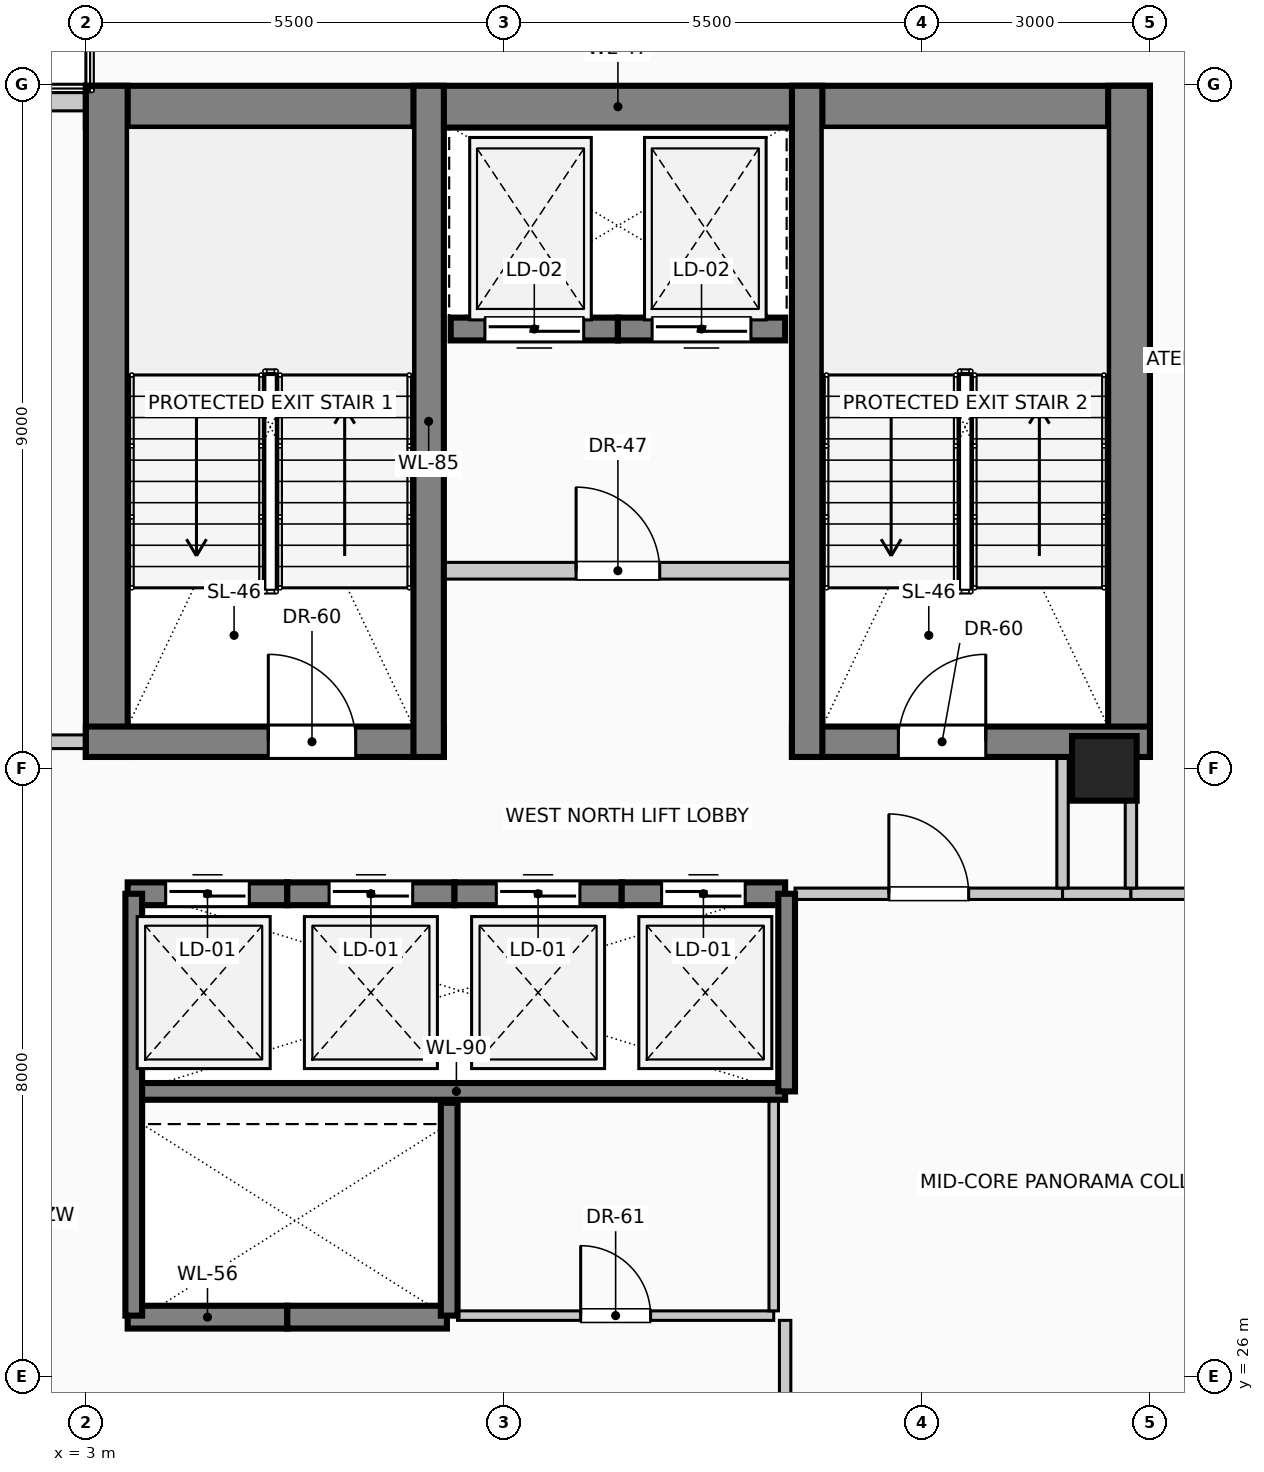
"""IFC4 building model, lengths in metres.
Left out: names, types, materials, properties, quantities, classifications, styles, units other than length and angle.
Written with IfcOpenShell. Run it as: python <this file> out.ifc"""

import sys

from ifc_helpers import new_model, si_unit, direction, frame, frame_2d, origin, origin_2d, place, context, subcontext, project, spatial, rectangle, circle, extrude, element, fill, save


model = new_model("IFC4")
c1 = context("Model", 3, precision=1e-05, world=origin(), true_north=direction((0.0, 1.0)))
c2 = subcontext(c1, "Body", "Model", "MODEL_VIEW")
j1 = project(units=[si_unit("LENGTHUNIT", "METRE"), si_unit("PLANEANGLEUNIT", "RADIAN")], contexts=[c1])
p1 = place(None, origin())
s1 = spatial("IfcSite", under=j1, at=p1, CompositionType="ELEMENT")
p2 = place(p1, origin())
s2 = spatial("IfcBuilding", under=s1, at=p2, CompositionType="ELEMENT")
p3 = place(p2, frame((0.0, 0.0, 272.6)))
s3 = spatial("IfcBuildingStorey", under=s2, at=p3, CompositionType="ELEMENT", Elevation=272.6)
p4 = place(p3, frame((3.0, 42.705, 0.0), z_axis=(0.0, 0.0, 1.0), x_axis=(1.0, 0.0, 0.0)))
e1 = element("IfcWall", 1, at=p4, inside=s3, PredefinedType="SHEAR", context=c2, shape_type="SweptSolid", body=[
    extrude(rectangle(XDim=14.0, YDim=0.55, at=frame_2d((7.0, 0.0))), origin(), (0.0, 0.0, 1.0), 4.0),
])
for number, where, z_axis, x_axis in (
    (2, (3.275, 34.15, 0.0), (0.0, 0.0, 1.0), (0.0, 1.0, 0.0)),
    (3, (16.725, 34.15, 0.0), (0.0, 0.0, 1.0), (0.0, 1.0, 0.0)),
):
    element("IfcWall", number, at=place(p3, frame(where, z_axis=z_axis, x_axis=x_axis)), inside=s3, PredefinedType="SHEAR", context=c2, shape_type="SweptSolid", body=[
        extrude(rectangle(XDim=8.83, YDim=0.55, at=frame_2d((4.415, 0.0))), origin(), (0.0, 0.0, 1.0), 4.0),
    ])
p5 = place(p3, frame((3.0, 34.35, 0.0), z_axis=(0.0, 0.0, 1.0), x_axis=(1.0, 0.0, 0.0)))
e4 = element("IfcWall", 4, at=p5, inside=s3, PredefinedType="SHEAR", context=c2, shape_type="SweptSolid", body=[
    extrude(rectangle(XDim=4.71, YDim=0.4, at=frame_2d((2.355, 0.0))), origin(), (0.0, 0.0, 1.0), 4.0),
])
p6 = place(p5, frame((2.4, 0.0, 0.0)))
e5 = element("IfcOpeningElement", 5, at=p6, cuts=e4, PredefinedType="OPENING", context=c2, shape_type="SweptSolid", body=[
    extrude(rectangle(XDim=1.15, YDim=2.2, at=frame_2d((0.575, 1.1))), frame((0.0, 0.21, 0.0), z_axis=(0.0, -1.0, 0.0), x_axis=(1.0, 0.0, 0.0)), (0.0, 0.0, 1.0), 0.42),
])
p7 = place(p3, frame((12.29, 34.35, 0.0), z_axis=(0.0, 0.0, 1.0), x_axis=(1.0, 0.0, 0.0)))
e6 = element("IfcWall", 6, at=p7, inside=s3, PredefinedType="SHEAR", context=c2, shape_type="SweptSolid", body=[
    extrude(rectangle(XDim=4.71, YDim=0.4, at=frame_2d((2.355, 0.0))), origin(), (0.0, 0.0, 1.0), 4.0),
])
p8 = place(p7, frame((1.4, 0.0, 0.0)))
e7 = element("IfcOpeningElement", 7, at=p8, cuts=e6, PredefinedType="OPENING", context=c2, shape_type="SweptSolid", body=[
    extrude(rectangle(XDim=1.15, YDim=2.2, at=frame_2d((0.575, 1.1))), frame((0.0, 0.21, 0.0), z_axis=(0.0, -1.0, 0.0), x_axis=(1.0, 0.0, 0.0)), (0.0, 0.0, 1.0), 0.42),
])
for number, where, z_axis, x_axis in (
    (8, (7.51, 34.15, 0.0), (0.0, 0.0, 1.0), (0.0, 1.0, 0.0)),
    (9, (12.49, 34.15, 0.0), (0.0, 0.0, 1.0), (0.0, 1.0, 0.0)),
):
    element("IfcWall", number, at=place(p3, frame(where, z_axis=z_axis, x_axis=x_axis)), inside=s3, PredefinedType="SHEAR", context=c2, shape_type="SweptSolid", body=[
        extrude(rectangle(XDim=8.83, YDim=0.4, at=frame_2d((4.415, 0.0))), origin(), (0.0, 0.0, 1.0), 4.0),
    ])
p9 = place(p3, frame((16.4, 34.0, 0.0), z_axis=(0.0, 0.0, 1.0), x_axis=(1.0, 0.0, 0.0)))
e10 = element("IfcColumn", 10, at=p9, inside=s3, PredefinedType="COLUMN", context=c2, shape_type="SweptSolid", body=[
    extrude(circle(Radius=0.425, at=origin_2d()), origin(), (0.0, 0.0, 1.0), 4.0),
])
p10 = place(p3, frame((0.6, 42.77, 0.0), z_axis=(0.0, 0.0, 1.0), x_axis=(1.0, 0.0, 0.0)))
e11 = element("IfcWall", 11, at=p10, inside=s3, PredefinedType="SOLIDWALL", context=c2, shape_type="SweptSolid", body=[
    extrude(rectangle(XDim=2.395, YDim=0.24, at=frame_2d((1.198, 0.0))), origin(), (0.0, 0.0, 1.0), 3.75),
])
p11 = place(p3, frame((3.55, 32.35, 0.0), z_axis=(0.0, 0.0, 1.0), x_axis=(1.0, 0.0, 0.0)))
e12 = element("IfcWall", 12, at=p11, inside=s3, PredefinedType="SOLIDWALL", context=c2, shape_type="SweptSolid", body=[
    extrude(rectangle(XDim=2.1, YDim=0.3, at=frame_2d((1.05, 0.0))), origin(), (0.0, 0.0, 1.0), 4.0),
])
p12 = place(p11, frame((0.5, 0.0, 0.0)))
e13 = element("IfcOpeningElement", 13, at=p12, cuts=e12, PredefinedType="OPENING", context=c2, shape_type="SweptSolid", body=[
    extrude(rectangle(XDim=1.1, YDim=2.2, at=frame_2d((0.55, 1.1))), frame((0.0, 0.16, 0.0), z_axis=(0.0, -1.0, 0.0), x_axis=(1.0, 0.0, 0.0)), (0.0, 0.0, 1.0), 0.32),
])
p13 = place(p3, frame((5.65, 32.35, 0.0), z_axis=(0.0, 0.0, 1.0), x_axis=(1.0, 0.0, 0.0)))
e14 = element("IfcWall", 14, at=p13, inside=s3, PredefinedType="SOLIDWALL", context=c2, shape_type="SweptSolid", body=[
    extrude(rectangle(XDim=2.2, YDim=0.3, at=frame_2d((1.1, 0.0))), origin(), (0.0, 0.0, 1.0), 4.0),
])
p14 = place(p13, frame((0.55, 0.0, 0.0)))
e15 = element("IfcOpeningElement", 15, at=p14, cuts=e14, PredefinedType="OPENING", context=c2, shape_type="SweptSolid", body=[
    extrude(rectangle(XDim=1.1, YDim=2.2, at=frame_2d((0.55, 1.1))), frame((0.0, 0.16, 0.0), z_axis=(0.0, -1.0, 0.0), x_axis=(1.0, 0.0, 0.0)), (0.0, 0.0, 1.0), 0.32),
])
p15 = place(p3, frame((7.85, 32.35, 0.0), z_axis=(0.0, 0.0, 1.0), x_axis=(1.0, 0.0, 0.0)))
e16 = element("IfcWall", 16, at=p15, inside=s3, PredefinedType="SOLIDWALL", context=c2, shape_type="SweptSolid", body=[
    extrude(rectangle(XDim=2.2, YDim=0.3, at=frame_2d((1.1, 0.0))), origin(), (0.0, 0.0, 1.0), 4.0),
])
p16 = place(p15, frame((0.55, 0.0, 0.0)))
e17 = element("IfcOpeningElement", 17, at=p16, cuts=e16, PredefinedType="OPENING", context=c2, shape_type="SweptSolid", body=[
    extrude(rectangle(XDim=1.1, YDim=2.2, at=frame_2d((0.55, 1.1))), frame((0.0, 0.16, 0.0), z_axis=(0.0, -1.0, 0.0), x_axis=(1.0, 0.0, 0.0)), (0.0, 0.0, 1.0), 0.32),
])
p17 = place(p3, frame((10.05, 32.35, 0.0), z_axis=(0.0, 0.0, 1.0), x_axis=(1.0, 0.0, 0.0)))
e18 = element("IfcWall", 18, at=p17, inside=s3, PredefinedType="SOLIDWALL", context=c2, shape_type="SweptSolid", body=[
    extrude(rectangle(XDim=2.15, YDim=0.3, at=frame_2d((1.075, 0.0))), origin(), (0.0, 0.0, 1.0), 4.0),
])
p18 = place(p17, frame((0.525, 0.0, 0.0)))
e19 = element("IfcOpeningElement", 19, at=p18, cuts=e18, PredefinedType="OPENING", context=c2, shape_type="SweptSolid", body=[
    extrude(rectangle(XDim=1.1, YDim=2.2, at=frame_2d((0.55, 1.1))), frame((0.0, 0.16, 0.0), z_axis=(0.0, -1.0, 0.0), x_axis=(1.0, 0.0, 0.0)), (0.0, 0.0, 1.0), 0.32),
])
p19 = place(p3, frame((5.65, 26.78, 0.0), z_axis=(0.0, 0.0, 1.0), x_axis=(-1.0, 0.0, 0.0)))
e20 = element("IfcWall", 20, at=p19, inside=s3, PredefinedType="SOLIDWALL", context=c2, shape_type="SweptSolid", body=[
    extrude(rectangle(XDim=2.1, YDim=0.3, at=frame_2d((1.05, 0.0))), origin(), (0.0, 0.0, 1.0), 4.0),
])
p20 = place(p3, frame((7.75, 26.78, 0.0), z_axis=(0.0, 0.0, 1.0), x_axis=(-1.0, 0.0, 0.0)))
e21 = element("IfcWall", 21, at=p20, inside=s3, PredefinedType="SOLIDWALL", context=c2, shape_type="SweptSolid", body=[
    extrude(rectangle(XDim=2.1, YDim=0.3, at=frame_2d((1.05, 0.0))), origin(), (0.0, 0.0, 1.0), 4.0),
])
p21 = place(p3, frame((10.0, 39.78, 0.0), z_axis=(0.0, 0.0, 1.0), x_axis=(-1.0, 0.0, 0.0)))
e22 = element("IfcWall", 22, at=p21, inside=s3, PredefinedType="SOLIDWALL", context=c2, shape_type="SweptSolid", body=[
    extrude(rectangle(XDim=2.2, YDim=0.3, at=frame_2d((1.1, 0.0))), origin(), (0.0, 0.0, 1.0), 4.0),
])
p22 = place(p21, frame((0.45, 0.0, 0.0)))
e23 = element("IfcOpeningElement", 23, at=p22, cuts=e22, PredefinedType="OPENING", context=c2, shape_type="SweptSolid", body=[
    extrude(rectangle(XDim=1.3, YDim=2.25, at=frame_2d((0.65, 1.125))), frame((0.0, 0.16, 0.0), z_axis=(0.0, -1.0, 0.0), x_axis=(1.0, 0.0, 0.0)), (0.0, 0.0, 1.0), 0.32),
])
p23 = place(p3, frame((12.2, 39.78, 0.0), z_axis=(0.0, 0.0, 1.0), x_axis=(-1.0, 0.0, 0.0)))
e24 = element("IfcWall", 24, at=p23, inside=s3, PredefinedType="SOLIDWALL", context=c2, shape_type="SweptSolid", body=[
    extrude(rectangle(XDim=2.2, YDim=0.3, at=frame_2d((1.1, 0.0))), origin(), (0.0, 0.0, 1.0), 4.0),
])
p24 = place(p23, frame((0.45, 0.0, 0.0)))
e25 = element("IfcOpeningElement", 25, at=p24, cuts=e24, PredefinedType="OPENING", context=c2, shape_type="SweptSolid", body=[
    extrude(rectangle(XDim=1.3, YDim=2.25, at=frame_2d((0.65, 1.125))), frame((0.0, 0.16, 0.0), z_axis=(0.0, -1.0, 0.0), x_axis=(1.0, 0.0, 0.0)), (0.0, 0.0, 1.0), 0.32),
])
p25 = place(p3, frame((3.55, 29.75, 0.0), z_axis=(0.0, 0.0, 1.0), x_axis=(1.0, 0.0, 0.0)))
e26 = element("IfcWall", 26, at=p25, inside=s3, PredefinedType="SOLIDWALL", context=c2, shape_type="SweptSolid", body=[
    extrude(rectangle(XDim=8.65, YDim=0.22, at=frame_2d((4.325, 0.0))), origin(), (0.0, 0.0, 1.0), 4.0),
])
p26 = place(p3, frame((3.63, 26.8, 0.0), z_axis=(0.0, 0.0, 1.0), x_axis=(0.0, 1.0, 0.0)))
e27 = element("IfcWall", 27, at=p26, inside=s3, PredefinedType="SOLIDWALL", context=c2, shape_type="SweptSolid", body=[
    extrude(rectangle(XDim=5.55, YDim=0.22, at=frame_2d((2.775, 0.0))), origin(), (0.0, 0.0, 1.0), 4.0),
])
p27 = place(p3, frame((7.78, 26.8, 0.0), z_axis=(0.0, 0.0, 1.0), x_axis=(0.0, 1.0, 0.0)))
e28 = element("IfcWall", 28, at=p27, inside=s3, PredefinedType="SOLIDWALL", context=c2, shape_type="SweptSolid", body=[
    extrude(rectangle(XDim=2.8, YDim=0.22, at=frame_2d((1.4, 0.0))), origin(), (0.0, 0.0, 1.0), 4.0),
])
p28 = place(p3, frame((12.22, 29.75, 0.0), z_axis=(0.0, 0.0, 1.0), x_axis=(0.0, 1.0, 0.0)))
e29 = element("IfcWall", 29, at=p28, inside=s3, PredefinedType="SOLIDWALL", context=c2, shape_type="SweptSolid", body=[
    extrude(rectangle(XDim=2.6, YDim=0.22, at=frame_2d((1.3, 0.0))), origin(), (0.0, 0.0, 1.0), 4.0),
])
p29 = place(p3, frame((7.51, 36.6, 0.0), z_axis=(0.0, 0.0, 1.0), x_axis=(1.0, 0.0, 0.0)))
e30 = element("IfcWall", 30, at=p29, inside=s3, PredefinedType="PARTITIONING", context=c2, shape_type="SweptSolid", body=[
    extrude(rectangle(XDim=4.98, YDim=0.22, at=frame_2d((2.49, 0.0))), origin(), (0.0, 0.0, 1.0), 3.75),
])
p30 = place(p29, frame((1.94, 0.0, 0.0)))
e31 = element("IfcOpeningElement", 31, at=p30, cuts=e30, PredefinedType="OPENING", context=c2, shape_type="SweptSolid", body=[
    extrude(rectangle(XDim=1.1, YDim=2.2, at=frame_2d((0.55, 1.1))), frame((0.0, 0.12, 0.0), z_axis=(0.0, -1.0, 0.0), x_axis=(1.0, 0.0, 0.0)), (0.0, 0.0, 1.0), 0.24),
])
p31 = place(p3, frame((7.89, 26.8, 0.0), z_axis=(0.0, 0.0, 1.0), x_axis=(1.0, 0.0, 0.0)))
e32 = element("IfcWall", 32, at=p31, inside=s3, PredefinedType="PARTITIONING", context=c2, shape_type="SweptSolid", body=[
    extrude(rectangle(XDim=4.16, YDim=0.125, at=frame_2d((2.08, 0.0))), origin(), (0.0, 0.0, 1.0), 3.75),
])
p32 = place(p31, frame((1.62, 0.0, 0.0)))
e33 = element("IfcOpeningElement", 33, at=p32, cuts=e32, PredefinedType="OPENING", context=c2, shape_type="SweptSolid", body=[
    extrude(rectangle(XDim=0.92, YDim=2.1, at=frame_2d((0.46, 1.05))), frame((0.0, 0.073, 0.0), z_axis=(0.0, -1.0, 0.0), x_axis=(1.0, 0.0, 0.0)), (0.0, 0.0, 1.0), 0.145),
])
p33 = place(p3, frame((12.33, 32.35, 0.0), z_axis=(0.0, 0.0, 1.0), x_axis=(1.0, 0.0, 0.0)))
e34 = element("IfcWall", 34, at=p33, inside=s3, PredefinedType="PARTITIONING", context=c2, shape_type="SweptSolid", body=[
    extrude(rectangle(XDim=3.52, YDim=0.15, at=frame_2d((1.76, 0.0))), origin(), (0.0, 0.0, 1.0), 3.75),
])
p34 = place(p33, frame((1.235, 0.0, 0.0)))
e35 = element("IfcOpeningElement", 35, at=p34, cuts=e34, PredefinedType="OPENING", context=c2, shape_type="SweptSolid", body=[
    extrude(rectangle(XDim=1.05, YDim=2.15, at=frame_2d((0.525, 1.075))), frame((0.0, 0.085, 0.0), z_axis=(0.0, -1.0, 0.0), x_axis=(1.0, 0.0, 0.0)), (0.0, 0.0, 1.0), 0.17),
])
p35 = place(p3, frame((15.85, 32.35, 0.0), z_axis=(0.0, 0.0, 1.0), x_axis=(1.0, 0.0, 0.0)))
e36 = element("IfcWall", 36, at=p35, inside=s3, PredefinedType="PARTITIONING", context=c2, shape_type="SweptSolid", body=[
    extrude(rectangle(XDim=0.9, YDim=0.15, at=frame_2d((0.45, 0.0))), origin(), (0.0, 0.0, 1.0), 3.75),
])
p36 = place(p3, frame((16.75, 32.35, 0.0), z_axis=(0.0, 0.0, 1.0), x_axis=(1.0, 0.0, 0.0)))
e37 = element("IfcWall", 37, at=p36, inside=s3, PredefinedType="PARTITIONING", context=c2, shape_type="SweptSolid", body=[
    extrude(rectangle(XDim=4.25, YDim=0.15, at=frame_2d((2.125, 0.0))), origin(), (0.0, 0.0, 1.0), 3.75),
])
p37 = place(p3, frame((1.075, 34.35, 0.0), z_axis=(0.0, 0.0, 1.0), x_axis=(1.0, 0.0, 0.0)))
e38 = element("IfcWall", 38, at=p37, inside=s3, PredefinedType="PARTITIONING", context=c2, shape_type="SweptSolid", body=[
    extrude(rectangle(XDim=1.925, YDim=0.18, at=frame_2d((0.962, 0.0))), origin(), (0.0, 0.0, 1.0), 3.75),
])
p38 = place(p3, frame((12.05, 26.863, 0.0), z_axis=(0.0, 0.0, 1.0), x_axis=(0.0, 1.0, 0.0)))
e39 = element("IfcWall", 39, at=p38, inside=s3, PredefinedType="PARTITIONING", context=c2, shape_type="SweptSolid", body=[
    extrude(rectangle(XDim=2.777, YDim=0.125, at=frame_2d((1.389, 0.0))), origin(), (0.0, 0.0, 1.0), 3.75),
])
p39 = place(p3, frame((12.2, 24.863, 0.0), z_axis=(0.0, 0.0, 1.0), x_axis=(0.0, 1.0, 0.0)))
e40 = element("IfcWall", 40, at=p39, inside=s3, PredefinedType="PARTITIONING", context=c2, shape_type="SweptSolid", body=[
    extrude(rectangle(XDim=1.875, YDim=0.15, at=frame_2d((0.938, 0.0))), origin(), (0.0, 0.0, 1.0), 3.75),
])
p40 = place(p3, frame((15.85, 32.425, 0.0), z_axis=(0.0, 0.0, 1.0), x_axis=(0.0, 1.0, 0.0)))
e41 = element("IfcWall", 41, at=p40, inside=s3, PredefinedType="PARTITIONING", context=c2, shape_type="SweptSolid", body=[
    extrude(rectangle(XDim=1.725, YDim=0.15, at=frame_2d((0.862, 0.0))), origin(), (0.0, 0.0, 1.0), 3.75),
])
p41 = place(p3, frame((16.75, 32.425, 0.0), z_axis=(0.0, 0.0, 1.0), x_axis=(0.0, 1.0, 0.0)))
e42 = element("IfcWall", 42, at=p41, inside=s3, PredefinedType="PARTITIONING", context=c2, shape_type="SweptSolid", body=[
    extrude(rectangle(XDim=1.15, YDim=0.15, at=frame_2d((0.575, 0.0))), origin(), (0.0, 0.0, 1.0), 3.75),
])
p42 = place(p12, origin())
e43 = element("IfcDoor", 43, at=p42, inside=s3, OperationType="SLIDING_TO_LEFT", PredefinedType="DOOR", context=c2, shape_type="SweptSolid", body=[
    extrude(rectangle(XDim=1.1, YDim=2.2, at=frame_2d((0.55, 1.1))), frame((0.0, 0.025, 0.0), z_axis=(0.0, -1.0, 0.0), x_axis=(1.0, 0.0, 0.0)), (0.0, 0.0, 1.0), 0.05),
])
fill(e13, e43)
p43 = place(p14, origin())
e44 = element("IfcDoor", 44, at=p43, inside=s3, OperationType="SLIDING_TO_RIGHT", PredefinedType="DOOR", context=c2, shape_type="SweptSolid", body=[
    extrude(rectangle(XDim=1.1, YDim=2.2, at=frame_2d((0.55, 1.1))), frame((0.0, 0.025, 0.0), z_axis=(0.0, -1.0, 0.0), x_axis=(1.0, 0.0, 0.0)), (0.0, 0.0, 1.0), 0.05),
])
fill(e15, e44)
p44 = place(p16, origin())
e45 = element("IfcDoor", 45, at=p44, inside=s3, OperationType="SLIDING_TO_LEFT", PredefinedType="DOOR", context=c2, shape_type="SweptSolid", body=[
    extrude(rectangle(XDim=1.1, YDim=2.2, at=frame_2d((0.55, 1.1))), frame((0.0, 0.025, 0.0), z_axis=(0.0, -1.0, 0.0), x_axis=(1.0, 0.0, 0.0)), (0.0, 0.0, 1.0), 0.05),
])
fill(e17, e45)
p45 = place(p18, origin())
e46 = element("IfcDoor", 46, at=p45, inside=s3, OperationType="SLIDING_TO_RIGHT", PredefinedType="DOOR", context=c2, shape_type="SweptSolid", body=[
    extrude(rectangle(XDim=1.1, YDim=2.2, at=frame_2d((0.55, 1.1))), frame((0.0, 0.025, 0.0), z_axis=(0.0, -1.0, 0.0), x_axis=(1.0, 0.0, 0.0)), (0.0, 0.0, 1.0), 0.05),
])
fill(e19, e46)
p46 = place(p22, origin())
e47 = element("IfcDoor", 47, at=p46, inside=s3, OperationType="SLIDING_TO_LEFT", PredefinedType="DOOR", context=c2, shape_type="SweptSolid", body=[
    extrude(rectangle(XDim=1.3, YDim=2.25, at=frame_2d((0.65, 1.125))), frame((0.0, 0.025, 0.0), z_axis=(0.0, -1.0, 0.0), x_axis=(1.0, 0.0, 0.0)), (0.0, 0.0, 1.0), 0.05),
])
fill(e23, e47)
p47 = place(p24, origin())
e48 = element("IfcDoor", 48, at=p47, inside=s3, OperationType="SLIDING_TO_RIGHT", PredefinedType="DOOR", context=c2, shape_type="SweptSolid", body=[
    extrude(rectangle(XDim=1.3, YDim=2.25, at=frame_2d((0.65, 1.125))), frame((0.0, 0.025, 0.0), z_axis=(0.0, -1.0, 0.0), x_axis=(1.0, 0.0, 0.0)), (0.0, 0.0, 1.0), 0.05),
])
fill(e25, e48)
p48 = place(p6, origin())
e49 = element("IfcDoor", 49, at=p48, inside=s3, OperationType="SINGLE_SWING_LEFT", PredefinedType="DOOR", context=c2, shape_type="SweptSolid", body=[
    extrude(rectangle(XDim=1.15, YDim=2.2, at=frame_2d((0.575, 1.1))), frame((0.0, 0.025, 0.0), z_axis=(0.0, -1.0, 0.0), x_axis=(1.0, 0.0, 0.0)), (0.0, 0.0, 1.0), 0.05),
])
fill(e5, e49)
p49 = place(p8, origin())
e50 = element("IfcDoor", 50, at=p49, inside=s3, OperationType="SINGLE_SWING_RIGHT", PredefinedType="DOOR", context=c2, shape_type="SweptSolid", body=[
    extrude(rectangle(XDim=1.15, YDim=2.2, at=frame_2d((0.575, 1.1))), frame((0.0, 0.025, 0.0), z_axis=(0.0, -1.0, 0.0), x_axis=(1.0, 0.0, 0.0)), (0.0, 0.0, 1.0), 0.05),
])
fill(e7, e50)
p50 = place(p30, origin())
e51 = element("IfcDoor", 51, at=p50, inside=s3, OperationType="SINGLE_SWING_LEFT", PredefinedType="DOOR", context=c2, shape_type="SweptSolid", body=[
    extrude(rectangle(XDim=1.1, YDim=2.2, at=frame_2d((0.55, 1.1))), frame((0.0, 0.025, 0.0), z_axis=(0.0, -1.0, 0.0), x_axis=(1.0, 0.0, 0.0)), (0.0, 0.0, 1.0), 0.05),
])
fill(e31, e51)
p51 = place(p32, origin())
e52 = element("IfcDoor", 52, at=p51, inside=s3, OperationType="SINGLE_SWING_LEFT", PredefinedType="DOOR", context=c2, shape_type="SweptSolid", body=[
    extrude(rectangle(XDim=0.92, YDim=2.1, at=frame_2d((0.46, 1.05))), frame((0.0, 0.025, 0.0), z_axis=(0.0, -1.0, 0.0), x_axis=(1.0, 0.0, 0.0)), (0.0, 0.0, 1.0), 0.05),
])
fill(e33, e52)
p52 = place(p34, origin())
e53 = element("IfcDoor", 53, at=p52, inside=s3, OperationType="SINGLE_SWING_LEFT", PredefinedType="DOOR", context=c2, shape_type="SweptSolid", body=[
    extrude(rectangle(XDim=1.05, YDim=2.15, at=frame_2d((0.525, 1.075))), frame((0.0, 0.025, 0.0), z_axis=(0.0, -1.0, 0.0), x_axis=(1.0, 0.0, 0.0)), (0.0, 0.0, 1.0), 0.05),
])
fill(e35, e53)
save(model, sys.argv[1])
